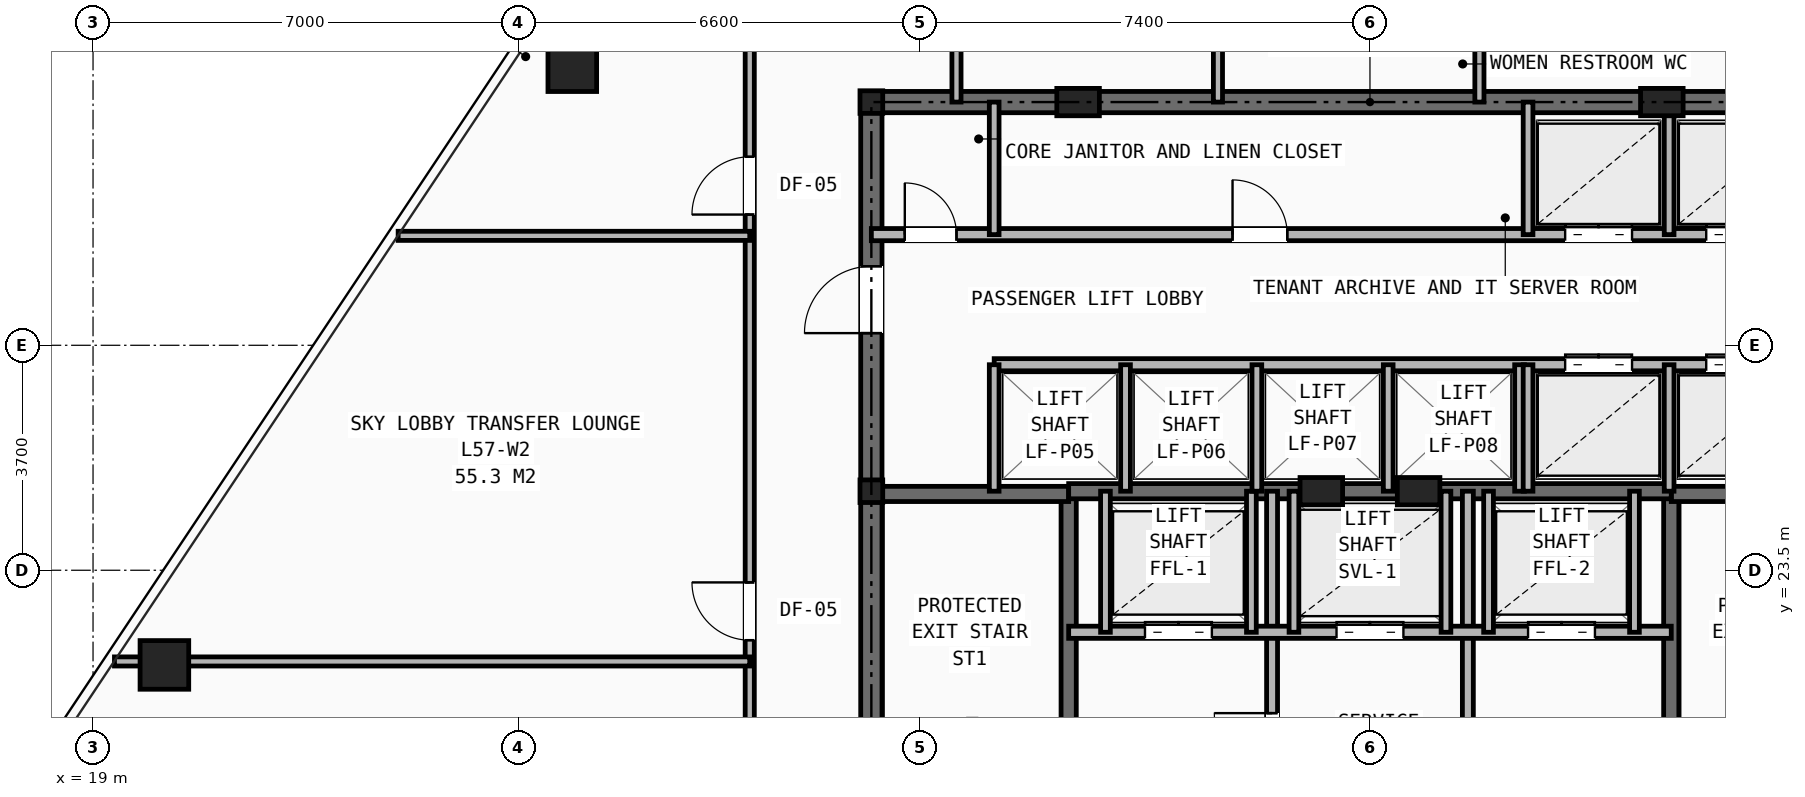
"""IFC4 building model, lengths in metres.
Left out: names, types, materials, properties, quantities, classifications, styles, units other than length and angle.
Written with IfcOpenShell. Run it as: python <this file> out.ifc"""

import sys

from ifc_helpers import new_model, si_unit, direction, frame, frame_2d, origin, origin_2d, place, context, subcontext, project, spatial, rectangle, hollow_rectangle, i_section, extrude, element, fill, save


model = new_model("IFC4")
c1 = context("Model", 3, precision=1e-05, world=origin(), true_north=direction((0.0, 1.0)))
c2 = subcontext(c1, "Body", "Model", "MODEL_VIEW")
j1 = project(units=[si_unit("LENGTHUNIT", "METRE"), si_unit("PLANEANGLEUNIT", "RADIAN")], contexts=[c1])
p1 = place(None, origin())
s1 = spatial("IfcSite", under=j1, at=p1, CompositionType="ELEMENT")
p2 = place(p1, origin())
s2 = spatial("IfcBuilding", under=s1, at=p2, CompositionType="ELEMENT")
p3 = place(p2, frame((0.0, 0.0, 200.7)))
s3 = spatial("IfcBuildingStorey", under=s2, at=p3, CompositionType="ELEMENT", Elevation=200.7)
for number, where, z_axis, x_axis in (
    (1, (31.8, 24.8, 0.0), (0.0, 0.0, 1.0), (1.0, 0.0, 0.0)),
    (2, (31.8, 31.2, 0.0), (0.0, 0.0, 1.0), (1.0, 0.0, 0.0)),
):
    element("IfcColumn", number, at=place(p3, frame(where, z_axis=z_axis, x_axis=x_axis)), inside=s3, PredefinedType="COLUMN", context=c2, shape_type="SweptSolid", body=[
        extrude(i_section(OverallWidth=0.374, OverallDepth=0.372, WebThickness=0.016, FlangeThickness=0.026, at=origin_2d()), origin(), (0.0, 0.0, 1.0), 4.2),
    ])
for number, where, z_axis, x_axis in (
    (3, (35.2, 31.2, 0.0), (0.0, 0.0, 1.0), (1.0, 0.0, 0.0)),
    (4, (44.8, 31.2, 0.0), (0.0, 0.0, 1.0), (1.0, 0.0, 0.0)),
    (5, (39.2, 24.8, 0.0), (0.0, 0.0, 1.0), (1.0, 0.0, 0.0)),
    (6, (40.8, 24.8, 0.0), (0.0, 0.0, 1.0), (1.0, 0.0, 0.0)),
):
    element("IfcColumn", number, at=place(p3, frame(where, z_axis=z_axis, x_axis=x_axis)), inside=s3, PredefinedType="PILASTER", context=c2, shape_type="SweptSolid", body=[
        extrude(rectangle(XDim=0.7, YDim=0.45, at=origin_2d()), origin(), (0.0, 0.0, 1.0), 4.2),
    ])
for number, where, z_axis, x_axis in (
    (7, (26.882, 31.774, 0.0), (0.0, 0.0, 1.0), (1.0, 0.0, 0.0)),
    (8, (20.174, 21.943, 0.0), (0.0, 0.0, 1.0), (1.0, 0.0, 0.0)),
):
    element("IfcColumn", number, at=place(p3, frame(where, z_axis=z_axis, x_axis=x_axis)), inside=s3, PredefinedType="COLUMN", context=c2, shape_type="SweptSolid", body=[
        extrude(hollow_rectangle(XDim=0.8, YDim=0.8, WallThickness=0.055, at=origin_2d()), origin(), (0.0, 0.0, 1.0), 4.2),
    ])
p4 = place(p3, frame((31.8, 31.2, 0.0), z_axis=(0.0, 0.0, 1.0), x_axis=(1.0, 0.0, 0.0)))
e9 = element("IfcWall", 9, at=p4, inside=s3, PredefinedType="SHEAR", context=c2, shape_type="SweptSolid", body=[
    extrude(rectangle(XDim=16.4, YDim=0.35, at=frame_2d((8.2, 0.0))), origin(), (0.0, 0.0, 1.0), 3.95),
])
p5 = place(p3, frame((31.8, 16.4, 0.0), z_axis=(0.0, 0.0, 1.0), x_axis=(0.0, 1.0, 0.0)))
e10 = element("IfcWall", 10, at=p5, inside=s3, PredefinedType="SHEAR", context=c2, shape_type="SweptSolid", body=[
    extrude(rectangle(XDim=14.8, YDim=0.35, at=frame_2d((7.4, 0.0))), origin(), (0.0, 0.0, 1.0), 3.95),
])
p6 = place(p5, frame((11.0, 0.0, 0.0)))
e11 = element("IfcOpeningElement", 11, at=p6, cuts=e10, PredefinedType="OPENING", context=c2, shape_type="SweptSolid", body=[
    extrude(rectangle(XDim=1.1, YDim=2.15, at=frame_2d((0.55, 1.075))), frame((0.0, 0.185, 0.0), z_axis=(0.0, -1.0, 0.0), x_axis=(1.0, 0.0, 0.0)), (0.0, 0.0, 1.0), 0.37),
])
p7 = place(p3, frame((35.045, 16.4, 0.0), z_axis=(0.0, 0.0, 1.0), x_axis=(0.0, 1.0, 0.0)))
e12 = element("IfcWall", 12, at=p7, inside=s3, PredefinedType="SHEAR", context=c2, shape_type="SweptSolid", body=[
    extrude(rectangle(XDim=8.4, YDim=0.25, at=frame_2d((4.2, 0.0))), origin(), (0.0, 0.0, 1.0), 3.95),
])
p8 = place(p7, frame((0.45, 0.0, 0.0)))
e13 = element("IfcOpeningElement", 13, at=p8, cuts=e12, PredefinedType="OPENING", context=c2, shape_type="SweptSolid", body=[
    extrude(rectangle(XDim=0.95, YDim=2.1, at=frame_2d((0.475, 1.05))), frame((0.0, 0.135, 0.0), z_axis=(0.0, -1.0, 0.0), x_axis=(1.0, 0.0, 0.0)), (0.0, 0.0, 1.0), 0.27),
])
p9 = place(p3, frame((31.8, 24.755, 0.0), z_axis=(0.0, 0.0, 1.0), x_axis=(1.0, 0.0, 0.0)))
e14 = element("IfcWall", 14, at=p9, inside=s3, PredefinedType="SHEAR", context=c2, shape_type="SweptSolid", body=[
    extrude(rectangle(XDim=3.245, YDim=0.25, at=frame_2d((1.623, 0.0))), origin(), (0.0, 0.0, 1.0), 3.95),
])
p10 = place(p3, frame((44.955, 16.4, 0.0), z_axis=(0.0, 0.0, 1.0), x_axis=(0.0, 1.0, 0.0)))
e15 = element("IfcWall", 15, at=p10, inside=s3, PredefinedType="SHEAR", context=c2, shape_type="SweptSolid", body=[
    extrude(rectangle(XDim=8.4, YDim=0.25, at=frame_2d((4.2, 0.0))), origin(), (0.0, 0.0, 1.0), 3.95),
])
p11 = place(p10, frame((0.45, 0.0, 0.0)))
e16 = element("IfcOpeningElement", 16, at=p11, cuts=e15, PredefinedType="OPENING", context=c2, shape_type="SweptSolid", body=[
    extrude(rectangle(XDim=0.95, YDim=2.1, at=frame_2d((0.475, 1.05))), frame((0.0, 0.135, 0.0), z_axis=(0.0, -1.0, 0.0), x_axis=(1.0, 0.0, 0.0)), (0.0, 0.0, 1.0), 0.27),
])
p12 = place(p3, frame((44.955, 24.755, 0.0), z_axis=(0.0, 0.0, 1.0), x_axis=(1.0, 0.0, 0.0)))
e17 = element("IfcWall", 17, at=p12, inside=s3, PredefinedType="SHEAR", context=c2, shape_type="SweptSolid", body=[
    extrude(rectangle(XDim=3.245, YDim=0.25, at=frame_2d((1.623, 0.0))), origin(), (0.0, 0.0, 1.0), 3.95),
])
p13 = place(p3, frame((35.045, 24.8, 0.0), z_axis=(0.0, 0.0, 1.0), x_axis=(1.0, 0.0, 0.0)))
e18 = element("IfcWall", 18, at=p13, inside=s3, PredefinedType="SHEAR", context=c2, shape_type="SweptSolid", body=[
    extrude(rectangle(XDim=9.91, YDim=0.25, at=frame_2d((4.955, 0.0))), origin(), (0.0, 0.0, 1.0), 3.95),
])
p14 = place(p3, frame((38.39, 16.4, 0.0), z_axis=(0.0, 0.0, 1.0), x_axis=(0.0, 1.0, 0.0)))
e19 = element("IfcWall", 19, at=p14, inside=s3, PredefinedType="PARTITIONING", context=c2, shape_type="SweptSolid", body=[
    extrude(rectangle(XDim=8.4, YDim=0.18, at=frame_2d((4.2, 0.0))), origin(), (0.0, 0.0, 1.0), 3.405),
])
p15 = place(p14, frame((3.8, 0.0, 0.0)))
e20 = element("IfcOpeningElement", 20, at=p15, cuts=e19, PredefinedType="OPENING", context=c2, shape_type="SweptSolid", body=[
    extrude(rectangle(XDim=0.95, YDim=2.1, at=frame_2d((0.475, 1.05))), frame((0.0, 0.1, 0.0), z_axis=(0.0, -1.0, 0.0), x_axis=(1.0, 0.0, 0.0)), (0.0, 0.0, 1.0), 0.2),
])
p16 = place(p3, frame((41.61, 16.4, 0.0), z_axis=(0.0, 0.0, 1.0), x_axis=(0.0, 1.0, 0.0)))
e21 = element("IfcWall", 21, at=p16, inside=s3, PredefinedType="PARTITIONING", context=c2, shape_type="SweptSolid", body=[
    extrude(rectangle(XDim=8.4, YDim=0.18, at=frame_2d((4.2, 0.0))), origin(), (0.0, 0.0, 1.0), 3.405),
])
p17 = place(p3, frame((35.045, 22.48, 0.0), z_axis=(0.0, 0.0, 1.0), x_axis=(1.0, 0.0, 0.0)))
e22 = element("IfcWall", 22, at=p17, inside=s3, PredefinedType="SOLIDWALL", context=c2, shape_type="SweptSolid", body=[
    extrude(rectangle(XDim=9.91, YDim=0.2, at=frame_2d((4.955, 0.0))), origin(), (0.0, 0.0, 1.0), 3.95),
])
p18 = place(p17, frame((1.255, 0.0, 0.0)))
e23 = element("IfcOpeningElement", 23, at=p18, cuts=e22, PredefinedType="OPENING", context=c2, shape_type="SweptSolid", body=[
    extrude(rectangle(XDim=1.1, YDim=2.15, at=frame_2d((0.55, 1.075))), frame((0.0, 0.11, 0.0), z_axis=(0.0, -1.0, 0.0), x_axis=(1.0, 0.0, 0.0)), (0.0, 0.0, 1.0), 0.22),
])
p19 = place(p17, frame((7.555, 0.0, 0.0)))
e24 = element("IfcOpeningElement", 24, at=p19, cuts=e22, PredefinedType="OPENING", context=c2, shape_type="SweptSolid", body=[
    extrude(rectangle(XDim=1.1, YDim=2.15, at=frame_2d((0.55, 1.075))), frame((0.0, 0.11, 0.0), z_axis=(0.0, -1.0, 0.0), x_axis=(1.0, 0.0, 0.0)), (0.0, 0.0, 1.0), 0.22),
])
p20 = place(p17, frame((4.405, 0.0, 0.0)))
e25 = element("IfcOpeningElement", 25, at=p20, cuts=e22, PredefinedType="OPENING", context=c2, shape_type="SweptSolid", body=[
    extrude(rectangle(XDim=1.1, YDim=2.15, at=frame_2d((0.55, 1.075))), frame((0.0, 0.11, 0.0), z_axis=(0.0, -1.0, 0.0), x_axis=(1.0, 0.0, 0.0)), (0.0, 0.0, 1.0), 0.22),
])
for number, where, z_axis, x_axis in (
    (26, (35.65, 22.48, 0.0), (0.0, 0.0, 1.0), (0.0, 1.0, 0.0)),
    (27, (38.05, 22.48, 0.0), (0.0, 0.0, 1.0), (0.0, 1.0, 0.0)),
    (28, (41.95, 22.48, 0.0), (0.0, 0.0, 1.0), (0.0, 1.0, 0.0)),
    (29, (44.35, 22.48, 0.0), (0.0, 0.0, 1.0), (0.0, 1.0, 0.0)),
    (30, (38.75, 22.48, 0.0), (0.0, 0.0, 1.0), (0.0, 1.0, 0.0)),
    (31, (41.25, 22.48, 0.0), (0.0, 0.0, 1.0), (0.0, 1.0, 0.0)),
):
    element("IfcWall", number, at=place(p3, frame(where, z_axis=z_axis, x_axis=x_axis)), inside=s3, PredefinedType="SOLIDWALL", context=c2, shape_type="SweptSolid", body=[
        extrude(rectangle(XDim=2.32, YDim=0.16, at=frame_2d((1.16, 0.0))), origin(), (0.0, 0.0, 1.0), 3.95),
    ])
p21 = place(p3, frame((31.8, 29.02, 0.0), z_axis=(0.0, 0.0, 1.0), x_axis=(1.0, 0.0, 0.0)))
e32 = element("IfcWall", 32, at=p21, inside=s3, PredefinedType="SOLIDWALL", context=c2, shape_type="SweptSolid", body=[
    extrude(rectangle(XDim=16.4, YDim=0.2, at=frame_2d((8.2, 0.0))), origin(), (0.0, 0.0, 1.0), 3.405),
])
p22 = place(p21, frame((0.55, 0.0, 0.0)))
e33 = element("IfcOpeningElement", 33, at=p22, cuts=e32, PredefinedType="OPENING", context=c2, shape_type="SweptSolid", body=[
    extrude(rectangle(XDim=0.85, YDim=2.05, at=frame_2d((0.425, 1.025))), frame((0.0, 0.11, 0.0), z_axis=(0.0, -1.0, 0.0), x_axis=(1.0, 0.0, 0.0)), (0.0, 0.0, 1.0), 0.22),
])
p23 = place(p21, frame((5.94, 0.0, 0.0)))
e34 = element("IfcOpeningElement", 34, at=p23, cuts=e32, PredefinedType="OPENING", context=c2, shape_type="SweptSolid", body=[
    extrude(rectangle(XDim=0.9, YDim=2.1, at=frame_2d((0.45, 1.05))), frame((0.0, 0.11, 0.0), z_axis=(0.0, -1.0, 0.0), x_axis=(1.0, 0.0, 0.0)), (0.0, 0.0, 1.0), 0.22),
])
p24 = place(p21, frame((11.41, 0.0, 0.0)))
e35 = element("IfcOpeningElement", 35, at=p24, cuts=e32, PredefinedType="OPENING", context=c2, shape_type="SweptSolid", body=[
    extrude(rectangle(XDim=1.1, YDim=2.15, at=frame_2d((0.55, 1.075))), frame((0.0, 0.11, 0.0), z_axis=(0.0, -1.0, 0.0), x_axis=(1.0, 0.0, 0.0)), (0.0, 0.0, 1.0), 0.22),
])
p25 = place(p21, frame((13.73, 0.0, 0.0)))
e36 = element("IfcOpeningElement", 36, at=p25, cuts=e32, PredefinedType="OPENING", context=c2, shape_type="SweptSolid", body=[
    extrude(rectangle(XDim=1.1, YDim=2.15, at=frame_2d((0.55, 1.075))), frame((0.0, 0.11, 0.0), z_axis=(0.0, -1.0, 0.0), x_axis=(1.0, 0.0, 0.0)), (0.0, 0.0, 1.0), 0.22),
])
p26 = place(p3, frame((33.82, 26.88, 0.0), z_axis=(0.0, 0.0, 1.0), x_axis=(1.0, 0.0, 0.0)))
e37 = element("IfcWall", 37, at=p26, inside=s3, PredefinedType="SOLIDWALL", context=c2, shape_type="SweptSolid", body=[
    extrude(rectangle(XDim=14.38, YDim=0.2, at=frame_2d((7.19, 0.0))), origin(), (0.0, 0.0, 1.0), 3.405),
])
p27 = place(p26, frame((9.39, 0.0, 0.0)))
e38 = element("IfcOpeningElement", 38, at=p27, cuts=e37, PredefinedType="OPENING", context=c2, shape_type="SweptSolid", body=[
    extrude(rectangle(XDim=1.1, YDim=2.15, at=frame_2d((0.55, 1.075))), frame((0.0, 0.11, 0.0), z_axis=(0.0, -1.0, 0.0), x_axis=(1.0, 0.0, 0.0)), (0.0, 0.0, 1.0), 0.22),
])
p28 = place(p26, frame((11.71, 0.0, 0.0)))
e39 = element("IfcOpeningElement", 39, at=p28, cuts=e37, PredefinedType="OPENING", context=c2, shape_type="SweptSolid", body=[
    extrude(rectangle(XDim=1.1, YDim=2.15, at=frame_2d((0.55, 1.075))), frame((0.0, 0.11, 0.0), z_axis=(0.0, -1.0, 0.0), x_axis=(1.0, 0.0, 0.0)), (0.0, 0.0, 1.0), 0.22),
])
p29 = place(p3, frame((33.82, 29.02, 0.0), z_axis=(0.0, 0.0, 1.0), x_axis=(0.0, 1.0, 0.0)))
e40 = element("IfcWall", 40, at=p29, inside=s3, PredefinedType="SOLIDWALL", context=c2, shape_type="SweptSolid", body=[
    extrude(rectangle(XDim=2.18, YDim=0.16, at=frame_2d((1.09, 0.0))), origin(), (0.0, 0.0, 1.0), 3.405),
])
for number, where, z_axis, x_axis in (
    (41, (33.82, 24.8, 0.0), (0.0, 0.0, 1.0), (0.0, 1.0, 0.0)),
    (42, (35.98, 24.8, 0.0), (0.0, 0.0, 1.0), (0.0, 1.0, 0.0)),
    (43, (38.14, 24.8, 0.0), (0.0, 0.0, 1.0), (0.0, 1.0, 0.0)),
    (44, (40.3, 24.8, 0.0), (0.0, 0.0, 1.0), (0.0, 1.0, 0.0)),
    (45, (42.46, 24.8, 0.0), (0.0, 0.0, 1.0), (0.0, 1.0, 0.0)),
):
    element("IfcWall", number, at=place(p3, frame(where, z_axis=z_axis, x_axis=x_axis)), inside=s3, PredefinedType="SOLIDWALL", context=c2, shape_type="SweptSolid", body=[
        extrude(rectangle(XDim=2.08, YDim=0.16, at=frame_2d((1.04, 0.0))), origin(), (0.0, 0.0, 1.0), 3.95),
    ])
for number, where, z_axis, x_axis in (
    (46, (42.6, 29.02, 0.0), (0.0, 0.0, 1.0), (0.0, 1.0, 0.0)),
    (47, (44.92, 29.02, 0.0), (0.0, 0.0, 1.0), (0.0, 1.0, 0.0)),
):
    element("IfcWall", number, at=place(p3, frame(where, z_axis=z_axis, x_axis=x_axis)), inside=s3, PredefinedType="SOLIDWALL", context=c2, shape_type="SweptSolid", body=[
        extrude(rectangle(XDim=2.18, YDim=0.16, at=frame_2d((1.09, 0.0))), origin(), (0.0, 0.0, 1.0), 3.405),
    ])
for number, where, z_axis, x_axis in (
    (48, (42.6, 24.8, 0.0), (0.0, 0.0, 1.0), (0.0, 1.0, 0.0)),
    (49, (44.92, 24.8, 0.0), (0.0, 0.0, 1.0), (0.0, 1.0, 0.0)),
):
    element("IfcWall", number, at=place(p3, frame(where, z_axis=z_axis, x_axis=x_axis)), inside=s3, PredefinedType="SOLIDWALL", context=c2, shape_type="SweptSolid", body=[
        extrude(rectangle(XDim=2.08, YDim=0.16, at=frame_2d((1.04, 0.0))), origin(), (0.0, 0.0, 1.0), 3.95),
    ])
for number, where, z_axis, x_axis in (
    (50, (33.2, 31.2, 0.0), (0.0, 0.0, 1.0), (0.0, 1.0, 0.0)),
    (51, (37.5, 31.2, 0.0), (0.0, 0.0, 1.0), (0.0, 1.0, 0.0)),
    (52, (41.8, 31.2, 0.0), (0.0, 0.0, 1.0), (0.0, 1.0, 0.0)),
):
    element("IfcWall", number, at=place(p3, frame(where, z_axis=z_axis, x_axis=x_axis)), inside=s3, PredefinedType="PARTITIONING", context=c2, shape_type="SweptSolid", body=[
        extrude(rectangle(XDim=2.6, YDim=0.15, at=frame_2d((1.3, 0.0))), origin(), (0.0, 0.0, 1.0), 3.405),
    ])
p30 = place(p3, frame((29.8, 16.4, 0.0), z_axis=(0.0, 0.0, 1.0), x_axis=(0.0, 1.0, 0.0)))
e53 = element("IfcWall", 53, at=p30, inside=s3, PredefinedType="PARTITIONING", context=c2, shape_type="SweptSolid", body=[
    extrude(rectangle(XDim=19.3, YDim=0.15, at=frame_2d((9.65, 0.0))), origin(), (0.0, 0.0, 1.0), 2.965),
])
p31 = place(p30, frame((0.35, 0.0, 0.0)))
e54 = element("IfcOpeningElement", 54, at=p31, cuts=e53, PredefinedType="OPENING", context=c2, shape_type="SweptSolid", body=[
    extrude(rectangle(XDim=0.95, YDim=2.1, at=frame_2d((0.475, 1.05))), frame((0.0, 0.085, 0.0), z_axis=(0.0, -1.0, 0.0), x_axis=(1.0, 0.0, 0.0)), (0.0, 0.0, 1.0), 0.17),
])
p32 = place(p30, frame((5.95, 0.0, 0.0)))
e55 = element("IfcOpeningElement", 55, at=p32, cuts=e53, PredefinedType="OPENING", context=c2, shape_type="SweptSolid", body=[
    extrude(rectangle(XDim=0.95, YDim=2.1, at=frame_2d((0.475, 1.05))), frame((0.0, 0.085, 0.0), z_axis=(0.0, -1.0, 0.0), x_axis=(1.0, 0.0, 0.0)), (0.0, 0.0, 1.0), 0.17),
])
p33 = place(p30, frame((12.95, 0.0, 0.0)))
e56 = element("IfcOpeningElement", 56, at=p33, cuts=e53, PredefinedType="OPENING", context=c2, shape_type="SweptSolid", body=[
    extrude(rectangle(XDim=0.95, YDim=2.1, at=frame_2d((0.475, 1.05))), frame((0.0, 0.085, 0.0), z_axis=(0.0, -1.0, 0.0), x_axis=(1.0, 0.0, 0.0)), (0.0, 0.0, 1.0), 0.17),
])
p34 = place(p3, frame((19.352, 22.0, 0.0), z_axis=(0.0, 0.0, 1.0), x_axis=(1.0, 0.0, 0.0)))
e57 = element("IfcWall", 57, at=p34, inside=s3, PredefinedType="PARTITIONING", context=c2, shape_type="SweptSolid", body=[
    extrude(rectangle(XDim=10.448, YDim=0.15, at=frame_2d((5.224, 0.0))), origin(), (0.0, 0.0, 1.0), 2.965),
])
p35 = place(p3, frame((24.018, 29.0, 0.0), z_axis=(0.0, 0.0, 1.0), x_axis=(1.0, 0.0, 0.0)))
e58 = element("IfcWall", 58, at=p35, inside=s3, PredefinedType="PARTITIONING", context=c2, shape_type="SweptSolid", body=[
    extrude(rectangle(XDim=5.782, YDim=0.15, at=frame_2d((2.891, 0.0))), origin(), (0.0, 0.0, 1.0), 3.329),
])
p36 = place(p15, origin())
e59 = element("IfcDoor", 59, at=p36, inside=s3, OperationType="SINGLE_SWING_RIGHT", PredefinedType="DOOR", context=c2, shape_type="SweptSolid", body=[
    extrude(rectangle(XDim=0.95, YDim=2.1, at=frame_2d((0.475, 1.05))), frame((0.0, 0.025, 0.0), z_axis=(0.0, -1.0, 0.0), x_axis=(1.0, 0.0, 0.0)), (0.0, 0.0, 1.0), 0.05),
])
fill(e20, e59)
p37 = place(p18, origin())
e60 = element("IfcDoor", 60, at=p37, inside=s3, OperationType="DOUBLE_DOOR_SLIDING", PredefinedType="DOOR", context=c2, shape_type="SweptSolid", body=[
    extrude(rectangle(XDim=1.1, YDim=2.15, at=frame_2d((0.55, 1.075))), frame((0.0, 0.025, 0.0), z_axis=(0.0, -1.0, 0.0), x_axis=(1.0, 0.0, 0.0)), (0.0, 0.0, 1.0), 0.05),
])
fill(e23, e60)
p38 = place(p19, origin())
e61 = element("IfcDoor", 61, at=p38, inside=s3, OperationType="DOUBLE_DOOR_SLIDING", PredefinedType="DOOR", context=c2, shape_type="SweptSolid", body=[
    extrude(rectangle(XDim=1.1, YDim=2.15, at=frame_2d((0.55, 1.075))), frame((0.0, 0.025, 0.0), z_axis=(0.0, -1.0, 0.0), x_axis=(1.0, 0.0, 0.0)), (0.0, 0.0, 1.0), 0.05),
])
fill(e24, e61)
p39 = place(p20, origin())
e62 = element("IfcDoor", 62, at=p39, inside=s3, OperationType="DOUBLE_DOOR_SLIDING", PredefinedType="DOOR", context=c2, shape_type="SweptSolid", body=[
    extrude(rectangle(XDim=1.1, YDim=2.15, at=frame_2d((0.55, 1.075))), frame((0.0, 0.025, 0.0), z_axis=(0.0, -1.0, 0.0), x_axis=(1.0, 0.0, 0.0)), (0.0, 0.0, 1.0), 0.05),
])
fill(e25, e62)
p40 = place(p22, origin())
e63 = element("IfcDoor", 63, at=p40, inside=s3, OperationType="SINGLE_SWING_LEFT", PredefinedType="DOOR", context=c2, shape_type="SweptSolid", body=[
    extrude(rectangle(XDim=0.85, YDim=2.05, at=frame_2d((0.425, 1.025))), frame((0.0, 0.025, 0.0), z_axis=(0.0, -1.0, 0.0), x_axis=(1.0, 0.0, 0.0)), (0.0, 0.0, 1.0), 0.05),
])
fill(e33, e63)
p41 = place(p6, origin())
e64 = element("IfcDoor", 64, at=p41, inside=s3, OperationType="SINGLE_SWING_LEFT", PredefinedType="DOOR", context=c2, shape_type="SweptSolid", body=[
    extrude(rectangle(XDim=1.1, YDim=2.15, at=frame_2d((0.55, 1.075))), frame((0.0, 0.025, 0.0), z_axis=(0.0, -1.0, 0.0), x_axis=(1.0, 0.0, 0.0)), (0.0, 0.0, 1.0), 0.05),
])
fill(e11, e64)
p42 = place(p23, origin())
e65 = element("IfcDoor", 65, at=p42, inside=s3, OperationType="SINGLE_SWING_LEFT", PredefinedType="DOOR", context=c2, shape_type="SweptSolid", body=[
    extrude(rectangle(XDim=0.9, YDim=2.1, at=frame_2d((0.45, 1.05))), frame((0.0, 0.025, 0.0), z_axis=(0.0, -1.0, 0.0), x_axis=(1.0, 0.0, 0.0)), (0.0, 0.0, 1.0), 0.05),
])
fill(e34, e65)
p43 = place(p24, origin())
e66 = element("IfcDoor", 66, at=p43, inside=s3, OperationType="DOUBLE_DOOR_SLIDING", PredefinedType="DOOR", context=c2, shape_type="SweptSolid", body=[
    extrude(rectangle(XDim=1.1, YDim=2.15, at=frame_2d((0.55, 1.075))), frame((0.0, 0.025, 0.0), z_axis=(0.0, -1.0, 0.0), x_axis=(1.0, 0.0, 0.0)), (0.0, 0.0, 1.0), 0.05),
])
fill(e35, e66)
p44 = place(p25, origin())
e67 = element("IfcDoor", 67, at=p44, inside=s3, OperationType="DOUBLE_DOOR_SLIDING", PredefinedType="DOOR", context=c2, shape_type="SweptSolid", body=[
    extrude(rectangle(XDim=1.1, YDim=2.15, at=frame_2d((0.55, 1.075))), frame((0.0, 0.025, 0.0), z_axis=(0.0, -1.0, 0.0), x_axis=(1.0, 0.0, 0.0)), (0.0, 0.0, 1.0), 0.05),
])
fill(e36, e67)
p45 = place(p27, origin())
e68 = element("IfcDoor", 68, at=p45, inside=s3, OperationType="DOUBLE_DOOR_SLIDING", PredefinedType="DOOR", context=c2, shape_type="SweptSolid", body=[
    extrude(rectangle(XDim=1.1, YDim=2.15, at=frame_2d((0.55, 1.075))), frame((0.0, 0.025, 0.0), z_axis=(0.0, -1.0, 0.0), x_axis=(1.0, 0.0, 0.0)), (0.0, 0.0, 1.0), 0.05),
])
fill(e38, e68)
p46 = place(p28, origin())
e69 = element("IfcDoor", 69, at=p46, inside=s3, OperationType="DOUBLE_DOOR_SLIDING", PredefinedType="DOOR", context=c2, shape_type="SweptSolid", body=[
    extrude(rectangle(XDim=1.1, YDim=2.15, at=frame_2d((0.55, 1.075))), frame((0.0, 0.025, 0.0), z_axis=(0.0, -1.0, 0.0), x_axis=(1.0, 0.0, 0.0)), (0.0, 0.0, 1.0), 0.05),
])
fill(e39, e69)
p47 = place(p32, origin())
e70 = element("IfcDoor", 70, at=p47, inside=s3, OperationType="SINGLE_SWING_RIGHT", PredefinedType="DOOR", context=c2, shape_type="SweptSolid", body=[
    extrude(rectangle(XDim=0.95, YDim=2.1, at=frame_2d((0.475, 1.05))), frame((0.0, 0.025, 0.0), z_axis=(0.0, -1.0, 0.0), x_axis=(1.0, 0.0, 0.0)), (0.0, 0.0, 1.0), 0.05),
])
fill(e55, e70)
p48 = place(p33, origin())
e71 = element("IfcDoor", 71, at=p48, inside=s3, OperationType="SINGLE_SWING_LEFT", PredefinedType="DOOR", context=c2, shape_type="SweptSolid", body=[
    extrude(rectangle(XDim=0.95, YDim=2.1, at=frame_2d((0.475, 1.05))), frame((0.0, 0.025, 0.0), z_axis=(0.0, -1.0, 0.0), x_axis=(1.0, 0.0, 0.0)), (0.0, 0.0, 1.0), 0.05),
])
fill(e56, e71)
save(model, sys.argv[1])
